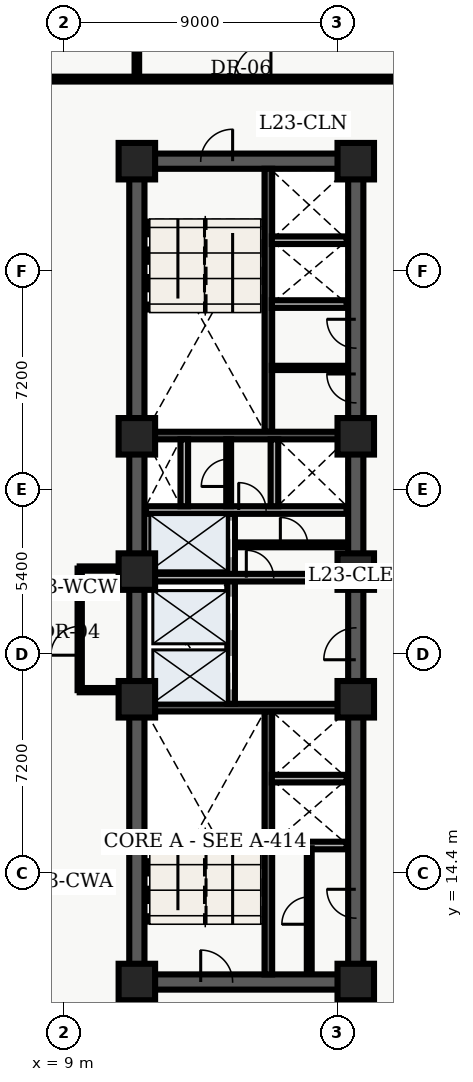
"""IFC4 building model, lengths in metres.
Left out: names, types, materials, properties, quantities, classifications, styles, units other than length and angle.
Written with IfcOpenShell. Run it as: python <this file> out.ifc"""

import sys

from ifc_helpers import new_model, entity, si_unit, converted_unit, direction, frame, origin_with_axes, origin_2d_with_axis, place, context, subcontext, project, spatial, polyline, rectangle, outline, extrude, element, fill, save


model = new_model("IFC4")
c1 = context("Model", 3, precision=1e-05, world=origin_with_axes(), true_north=direction((0.0, 1.0)))
c2 = subcontext(c1, "Body", "Model", "MODEL_VIEW")
j1 = project(units=[si_unit("LENGTHUNIT", "METRE"), converted_unit("PLANEANGLEUNIT", "DEGREE", entity("IfcPlaneAngleMeasure", 0.017), si_unit("PLANEANGLEUNIT", "RADIAN"), dimensions=[0, 0, 0, 0, 0, 0, 0])], contexts=[c1])
p1 = place(None, origin_with_axes())
s1 = spatial("IfcSite", under=j1, at=p1, CompositionType="ELEMENT")
p2 = place(p1, origin_with_axes())
s2 = spatial("IfcBuilding", under=s1, at=p2, CompositionType="ELEMENT")
p3 = place(p2, frame((0.0, 0.0, 96.9), z_axis=(0.0, 0.0, 1.0), x_axis=(1.0, 0.0, 0.0)))
s3 = spatial("IfcBuildingStorey", under=s2, at=p3, CompositionType="ELEMENT", Elevation=96.9)
p4 = place(p3, frame((11.4, 10.8, 0.0), z_axis=(0.0, 0.0, 1.0), x_axis=(0.0, 1.0, 0.0)))
e1 = element("IfcWall", 1, at=p4, inside=s3, PredefinedType="SHEAR", context=c2, shape_type="SweptSolid", body=[
    extrude(outline(polyline([(0.0, -0.25), (27.0, -0.25), (27.0, 0.25), (0.0, 0.25), (0.0, -0.25)])), origin_with_axes(), (0.0, 0.0, 1.0), 3.66),
])
p5 = place(p3, frame((11.4, 10.8, 0.0), z_axis=(0.0, 0.0, 1.0), x_axis=(1.0, 0.0, 0.0)))
e2 = element("IfcWall", 2, at=p5, inside=s3, PredefinedType="SHEAR", context=c2, shape_type="SweptSolid", body=[
    extrude(outline(polyline([(0.0, -0.25), (7.2, -0.25), (7.2, 0.25), (0.0, 0.25), (0.0, -0.25)])), origin_with_axes(), (0.0, 0.0, 1.0), 3.66),
])
p6 = place(p5, frame((2.625, 0.0, 0.0), z_axis=(0.0, 0.0, 1.0), x_axis=(1.0, 0.0, 0.0)))
e3 = element("IfcOpeningElement", 3, at=p6, cuts=e2, PredefinedType="OPENING", context=c2, shape_type="SweptSolid", body=[
    extrude(rectangle(XDim=1.05, YDim=0.52, at=origin_2d_with_axis()), origin_with_axes(), (0.0, 0.0, 1.0), 2.15),
])
p7 = place(p3, frame((11.4, 37.8, 0.0), z_axis=(0.0, 0.0, 1.0), x_axis=(1.0, 0.0, 0.0)))
e4 = element("IfcWall", 4, at=p7, inside=s3, PredefinedType="SHEAR", context=c2, shape_type="SweptSolid", body=[
    extrude(outline(polyline([(0.0, -0.25), (7.2, -0.25), (7.2, 0.25), (0.0, 0.25), (0.0, -0.25)])), origin_with_axes(), (0.0, 0.0, 1.0), 3.66),
])
p8 = place(p7, frame((2.625, 0.0, 0.0), z_axis=(0.0, 0.0, 1.0), x_axis=(1.0, 0.0, 0.0)))
e5 = element("IfcOpeningElement", 5, at=p8, cuts=e4, PredefinedType="OPENING", context=c2, shape_type="SweptSolid", body=[
    extrude(rectangle(XDim=1.05, YDim=0.52, at=origin_2d_with_axis()), origin_with_axes(), (0.0, 0.0, 1.0), 2.15),
])
p9 = place(p3, frame((18.6, 10.8, 0.0), z_axis=(0.0, 0.0, 1.0), x_axis=(0.0, 1.0, 0.0)))
e6 = element("IfcWall", 6, at=p9, inside=s3, PredefinedType="SHEAR", context=c2, shape_type="SweptSolid", body=[
    extrude(outline(polyline([(0.0, -0.25), (13.5, -0.25), (13.5, 0.25), (0.0, 0.25), (0.0, -0.25)])), origin_with_axes(), (0.0, 0.0, 1.0), 3.66),
])
p10 = place(p9, frame((11.125, 0.0, 0.0), z_axis=(0.0, 0.0, 1.0), x_axis=(1.0, 0.0, 0.0)))
e7 = element("IfcOpeningElement", 7, at=p10, cuts=e6, PredefinedType="OPENING", context=c2, shape_type="SweptSolid", body=[
    extrude(rectangle(XDim=1.05, YDim=0.52, at=origin_2d_with_axis()), origin_with_axes(), (0.0, 0.0, 1.0), 2.15),
])
p11 = place(p9, frame((2.575, 0.0, 0.0), z_axis=(0.0, 0.0, 1.0), x_axis=(1.0, 0.0, 0.0)))
e8 = element("IfcOpeningElement", 8, at=p11, cuts=e6, PredefinedType="OPENING", context=c2, shape_type="SweptSolid", body=[
    extrude(rectangle(XDim=0.95, YDim=0.52, at=origin_2d_with_axis()), origin_with_axes(), (0.0, 0.0, 1.0), 2.15),
])
p12 = place(p3, frame((18.6, 24.3, 0.0), z_axis=(0.0, 0.0, 1.0), x_axis=(0.0, 1.0, 0.0)))
e9 = element("IfcWall", 9, at=p12, inside=s3, PredefinedType="SHEAR", context=c2, shape_type="SweptSolid", body=[
    extrude(outline(polyline([(0.0, -0.25), (13.5, -0.25), (13.5, 0.25), (0.0, 0.25), (0.0, -0.25)])), origin_with_axes(), (0.0, 0.0, 1.0), 3.66),
])
p13 = place(p12, frame((6.025, 0.0, 0.0), z_axis=(0.0, 0.0, 1.0), x_axis=(1.0, 0.0, 0.0)))
e10 = element("IfcOpeningElement", 10, at=p13, cuts=e9, PredefinedType="OPENING", context=c2, shape_type="SweptSolid", body=[
    extrude(rectangle(XDim=0.95, YDim=0.52, at=origin_2d_with_axis()), origin_with_axes(), (0.0, 0.0, 1.0), 2.15),
])
p14 = place(p12, frame((7.825, 0.0, 0.0), z_axis=(0.0, 0.0, 1.0), x_axis=(1.0, 0.0, 0.0)))
e11 = element("IfcOpeningElement", 11, at=p14, cuts=e9, PredefinedType="OPENING", context=c2, shape_type="SweptSolid", body=[
    extrude(rectangle(XDim=0.95, YDim=0.52, at=origin_2d_with_axis()), origin_with_axes(), (0.0, 0.0, 1.0), 2.15),
])
p15 = place(p3, frame((15.725, 11.05, 0.0), z_axis=(0.0, 0.0, 1.0), x_axis=(0.0, 1.0, 0.0)))
e12 = element("IfcWall", 12, at=p15, inside=s3, PredefinedType="SHEAR", context=c2, shape_type="SweptSolid", body=[
    extrude(outline(polyline([(0.0, -0.125), (8.65, -0.125), (8.65, 0.125), (0.0, 0.125), (0.0, -0.125)])), origin_with_axes(), (0.0, 0.0, 1.0), 3.66),
])
p16 = place(p3, frame((11.65, 19.825, 0.0), z_axis=(0.0, 0.0, 1.0), x_axis=(1.0, 0.0, 0.0)))
e13 = element("IfcWall", 13, at=p16, inside=s3, PredefinedType="SHEAR", context=c2, shape_type="SweptSolid", body=[
    extrude(outline(polyline([(0.0, -0.125), (6.7, -0.125), (6.7, 0.125), (0.0, 0.125), (0.0, -0.125)])), origin_with_axes(), (0.0, 0.0, 1.0), 3.66),
])
p17 = place(p3, frame((15.725, 28.9, 0.0), z_axis=(0.0, 0.0, 1.0), x_axis=(0.0, 1.0, 0.0)))
e14 = element("IfcWall", 14, at=p17, inside=s3, PredefinedType="SHEAR", context=c2, shape_type="SweptSolid", body=[
    extrude(outline(polyline([(0.0, -0.125), (8.65, -0.125), (8.65, 0.125), (0.0, 0.125), (0.0, -0.125)])), origin_with_axes(), (0.0, 0.0, 1.0), 3.66),
])
p18 = place(p3, frame((11.65, 28.775, 0.0), z_axis=(0.0, 0.0, 1.0), x_axis=(1.0, 0.0, 0.0)))
e15 = element("IfcWall", 15, at=p18, inside=s3, PredefinedType="SHEAR", context=c2, shape_type="SweptSolid", body=[
    extrude(outline(polyline([(0.0, -0.125), (6.7, -0.125), (6.7, 0.125), (0.0, 0.125), (0.0, -0.125)])), origin_with_axes(), (0.0, 0.0, 1.0), 3.66),
])
p19 = place(p3, frame((14.5, 19.95, 0.0), z_axis=(0.0, 0.0, 1.0), x_axis=(0.0, 1.0, 0.0)))
e16 = element("IfcWall", 16, at=p19, inside=s3, PredefinedType="SOLIDWALL", context=c2, shape_type="SweptSolid", body=[
    extrude(outline(polyline([(0.0, -0.125), (6.25, -0.125), (6.25, 0.125), (0.0, 0.125), (0.0, -0.125)])), origin_with_axes(), (0.0, 0.0, 1.0), 2.7),
])
p20 = place(p19, frame((1.025, 0.0, 0.0), z_axis=(0.0, 0.0, 1.0), x_axis=(1.0, 0.0, 0.0)))
e17 = element("IfcOpeningElement", 17, at=p20, cuts=e16, PredefinedType="OPENING", context=c2, shape_type="SweptSolid", body=[
    extrude(rectangle(XDim=1.1, YDim=0.27, at=origin_2d_with_axis()), origin_with_axes(), (0.0, 0.0, 1.0), 2.15),
])
p21 = place(p19, frame((2.975, 0.0, 0.0), z_axis=(0.0, 0.0, 1.0), x_axis=(1.0, 0.0, 0.0)))
e18 = element("IfcOpeningElement", 18, at=p21, cuts=e16, PredefinedType="OPENING", context=c2, shape_type="SweptSolid", body=[
    extrude(rectangle(XDim=1.1, YDim=0.27, at=origin_2d_with_axis()), origin_with_axes(), (0.0, 0.0, 1.0), 2.15),
])
p22 = place(p19, frame((5.425, 0.0, 0.0), z_axis=(0.0, 0.0, 1.0), x_axis=(1.0, 0.0, 0.0)))
e19 = element("IfcOpeningElement", 19, at=p22, cuts=e16, PredefinedType="OPENING", context=c2, shape_type="SweptSolid", body=[
    extrude(rectangle(XDim=1.2, YDim=0.27, at=origin_2d_with_axis()), origin_with_axes(), (0.0, 0.0, 1.0), 2.15),
])
p23 = place(p3, frame((11.7, 24.1, 0.0), z_axis=(0.0, 0.0, 1.0), x_axis=(1.0, 0.0, 0.0)))
e20 = element("IfcWall", 20, at=p23, inside=s3, PredefinedType="SOLIDWALL", context=c2, shape_type="SweptSolid", body=[
    extrude(outline(polyline([(0.0, -0.125), (6.6, -0.125), (6.6, 0.125), (0.0, 0.125), (0.0, -0.125)])), origin_with_axes(), (0.0, 0.0, 1.0), 2.7),
])
p24 = place(p23, frame((3.75, 0.0, 0.0), z_axis=(0.0, 0.0, 1.0), x_axis=(1.0, 0.0, 0.0)))
e21 = element("IfcOpeningElement", 21, at=p24, cuts=e20, PredefinedType="OPENING", context=c2, shape_type="SweptSolid", body=[
    extrude(rectangle(XDim=0.9, YDim=0.27, at=origin_2d_with_axis()), origin_with_axes(), (0.0, 0.0, 1.0), 2.15),
])
p25 = place(p3, frame((11.7, 26.325, 0.0), z_axis=(0.0, 0.0, 1.0), x_axis=(1.0, 0.0, 0.0)))
e22 = element("IfcWall", 22, at=p25, inside=s3, PredefinedType="SOLIDWALL", context=c2, shape_type="SweptSolid", body=[
    extrude(outline(polyline([(0.0, -0.125), (6.6, -0.125), (6.6, 0.125), (0.0, 0.125), (0.0, -0.125)])), origin_with_axes(), (0.0, 0.0, 1.0), 2.7),
])
p26 = place(p25, frame((3.5, 0.0, 0.0), z_axis=(0.0, 0.0, 1.0), x_axis=(1.0, 0.0, 0.0)))
e23 = element("IfcOpeningElement", 23, at=p26, cuts=e22, PredefinedType="OPENING", context=c2, shape_type="SweptSolid", body=[
    extrude(rectangle(XDim=0.9, YDim=0.27, at=origin_2d_with_axis()), origin_with_axes(), (0.0, 0.0, 1.0), 2.15),
])
for number, where, z_axis, x_axis in (
    (24, (12.96, 26.45, 0.0), (0.0, 0.0, 1.0), (0.0, 1.0, 0.0)),
    (25, (15.925, 26.45, 0.0), (0.0, 0.0, 1.0), (0.0, 1.0, 0.0)),
):
    element("IfcWall", number, at=place(p3, frame(where, z_axis=z_axis, x_axis=x_axis)), inside=s3, PredefinedType="SOLIDWALL", context=c2, shape_type="SweptSolid", body=[
        extrude(outline(polyline([(0.0, -0.125), (2.2, -0.125), (2.2, 0.125), (0.0, 0.125), (0.0, -0.125)])), origin_with_axes(), (0.0, 0.0, 1.0), 2.7),
    ])
for number, where, z_axis, x_axis in (
    (26, (11.4, 10.8, 0.0), (0.0, 0.0, 1.0), (1.0, 0.0, 0.0)),
    (27, (11.4, 20.1, 0.0), (0.0, 0.0, 1.0), (1.0, 0.0, 0.0)),
    (28, (11.4, 24.3, 0.0), (0.0, 0.0, 1.0), (1.0, 0.0, 0.0)),
    (29, (11.4, 28.75, 0.0), (0.0, 0.0, 1.0), (1.0, 0.0, 0.0)),
    (30, (11.4, 37.8, 0.0), (0.0, 0.0, 1.0), (1.0, 0.0, 0.0)),
    (31, (18.6, 10.8, 0.0), (0.0, 0.0, 1.0), (1.0, 0.0, 0.0)),
    (32, (18.6, 20.1, 0.0), (0.0, 0.0, 1.0), (1.0, 0.0, 0.0)),
    (33, (18.6, 24.3, 0.0), (0.0, 0.0, 1.0), (1.0, 0.0, 0.0)),
    (34, (18.6, 28.75, 0.0), (0.0, 0.0, 1.0), (1.0, 0.0, 0.0)),
    (35, (18.6, 37.8, 0.0), (0.0, 0.0, 1.0), (1.0, 0.0, 0.0)),
):
    element("IfcColumn", number, at=place(p3, frame(where, z_axis=z_axis, x_axis=x_axis)), inside=s3, PredefinedType="COLUMN", context=c2, shape_type="SweptSolid", body=[
        extrude(rectangle(XDim=1.2, YDim=1.2, at=origin_2d_with_axis()), origin_with_axes(), (0.0, 0.0, 1.0), 3.9),
    ])
p27 = place(p3, frame((14.62, 25.18, 0.0), z_axis=(0.0, 0.0, 1.0), x_axis=(1.0, 0.0, 0.0)))
e36 = element("IfcWall", 36, at=p27, inside=s3, PredefinedType="PARTITIONING", context=c2, shape_type="SweptSolid", body=[
    extrude(outline(polyline([(0.0, -0.08), (3.68, -0.08), (3.68, 0.08), (0.0, 0.08), (0.0, -0.08)])), origin_with_axes(), (0.0, 0.0, 1.0), 2.7),
])
p28 = place(p27, frame((1.95, 0.0, 0.0), z_axis=(0.0, 0.0, 1.0), x_axis=(1.0, 0.0, 0.0)))
e37 = element("IfcOpeningElement", 37, at=p28, cuts=e36, PredefinedType="OPENING", context=c2, shape_type="SweptSolid", body=[
    extrude(rectangle(XDim=0.9, YDim=0.18, at=origin_2d_with_axis()), origin_with_axes(), (0.0, 0.0, 1.0), 2.15),
])
p29 = place(p3, frame((14.42, 26.45, 0.0), z_axis=(0.0, 0.0, 1.0), x_axis=(0.0, 1.0, 0.0)))
e38 = element("IfcWall", 38, at=p29, inside=s3, PredefinedType="PARTITIONING", context=c2, shape_type="SweptSolid", body=[
    extrude(outline(polyline([(0.0, -0.08), (2.2, -0.08), (2.2, 0.08), (0.0, 0.08), (0.0, -0.08)])), origin_with_axes(), (0.0, 0.0, 1.0), 2.7),
])
p30 = place(p29, frame((1.1, 0.0, 0.0), z_axis=(0.0, 0.0, 1.0), x_axis=(1.0, 0.0, 0.0)))
e39 = element("IfcOpeningElement", 39, at=p30, cuts=e38, PredefinedType="OPENING", context=c2, shape_type="SweptSolid", body=[
    extrude(rectangle(XDim=0.9, YDim=0.18, at=origin_2d_with_axis()), origin_with_axes(), (0.0, 0.0, 1.0), 2.15),
])
for number, where, z_axis, x_axis in (
    (40, (15.84, 15.29, 0.0), (0.0, 0.0, 1.0), (1.0, 0.0, 0.0)),
    (41, (15.84, 17.49, 0.0), (0.0, 0.0, 1.0), (1.0, 0.0, 0.0)),
):
    element("IfcWall", number, at=place(p3, frame(where, z_axis=z_axis, x_axis=x_axis)), inside=s3, PredefinedType="SOLIDWALL", context=c2, shape_type="SweptSolid", body=[
        extrude(outline(polyline([(0.0, -0.125), (2.46, -0.125), (2.46, 0.125), (0.0, 0.125), (0.0, -0.125)])), origin_with_axes(), (0.0, 0.0, 1.0), 2.7),
    ])
p31 = place(p3, frame((17.07, 11.1, 0.0), z_axis=(0.0, 0.0, 1.0), x_axis=(0.0, 1.0, 0.0)))
e42 = element("IfcWall", 42, at=p31, inside=s3, PredefinedType="PARTITIONING", context=c2, shape_type="SweptSolid", body=[
    extrude(outline(polyline([(0.0, -0.08), (4.1, -0.08), (4.1, 0.08), (0.0, 0.08), (0.0, -0.08)])), origin_with_axes(), (0.0, 0.0, 1.0), 2.7),
])
p32 = place(p31, frame((2.05, 0.0, 0.0), z_axis=(0.0, 0.0, 1.0), x_axis=(1.0, 0.0, 0.0)))
e43 = element("IfcOpeningElement", 43, at=p32, cuts=e42, PredefinedType="OPENING", context=c2, shape_type="SweptSolid", body=[
    extrude(rectangle(XDim=0.9, YDim=0.18, at=origin_2d_with_axis()), origin_with_axes(), (0.0, 0.0, 1.0), 2.15),
])
for number, where, z_axis, x_axis in (
    (44, (15.84, 33.1, 0.0), (0.0, 0.0, 1.0), (1.0, 0.0, 0.0)),
    (45, (15.84, 35.2, 0.0), (0.0, 0.0, 1.0), (1.0, 0.0, 0.0)),
):
    element("IfcWall", number, at=place(p3, frame(where, z_axis=z_axis, x_axis=x_axis)), inside=s3, PredefinedType="SOLIDWALL", context=c2, shape_type="SweptSolid", body=[
        extrude(outline(polyline([(0.0, -0.125), (2.46, -0.125), (2.46, 0.125), (0.0, 0.125), (0.0, -0.125)])), origin_with_axes(), (0.0, 0.0, 1.0), 2.7),
    ])
p33 = place(p3, frame((15.84, 31.0, 0.0), z_axis=(0.0, 0.0, 1.0), x_axis=(1.0, 0.0, 0.0)))
e46 = element("IfcWall", 46, at=p33, inside=s3, PredefinedType="PARTITIONING", context=c2, shape_type="SweptSolid", body=[
    extrude(outline(polyline([(0.0, -0.07), (2.46, -0.07), (2.46, 0.07), (0.0, 0.07), (0.0, -0.07)])), origin_with_axes(), (0.0, 0.0, 1.0), 2.7),
])
p34 = place(p3, frame((9.52, 20.4, 0.0), z_axis=(0.0, 0.0, 1.0), x_axis=(0.0, 1.0, 0.0)))
e47 = element("IfcWall", 47, at=p34, inside=s3, PredefinedType="PARTITIONING", context=c2, shape_type="SweptSolid", body=[
    extrude(outline(polyline([(0.0, -0.07), (4.0, -0.07), (4.0, 0.07), (0.0, 0.07), (0.0, -0.07)])), origin_with_axes(), (0.0, 0.0, 1.0), 2.7),
])
p35 = place(p34, frame((1.625, 0.0, 0.0), z_axis=(0.0, 0.0, 1.0), x_axis=(1.0, 0.0, 0.0)))
e48 = element("IfcOpeningElement", 48, at=p35, cuts=e47, PredefinedType="OPENING", context=c2, shape_type="SweptSolid", body=[
    extrude(rectangle(XDim=0.95, YDim=0.16, at=origin_2d_with_axis()), origin_with_axes(), (0.0, 0.0, 1.0), 2.15),
])
for number, where, z_axis, x_axis in (
    (49, (9.52, 20.4, 0.0), (0.0, 0.0, 1.0), (1.0, 0.0, 0.0)),
    (50, (9.52, 24.4, 0.0), (0.0, 0.0, 1.0), (1.0, 0.0, 0.0)),
):
    element("IfcWall", number, at=place(p3, frame(where, z_axis=z_axis, x_axis=x_axis)), inside=s3, PredefinedType="PARTITIONING", context=c2, shape_type="SweptSolid", body=[
        extrude(outline(polyline([(0.0, -0.07), (1.58, -0.07), (1.58, 0.07), (0.0, 0.07), (0.0, -0.07)])), origin_with_axes(), (0.0, 0.0, 1.0), 2.7),
    ])
p36 = place(p3, frame((2.6, 40.5, 0.0), z_axis=(0.0, 0.0, 1.0), x_axis=(1.0, 0.0, 0.0)))
e51 = element("IfcWall", 51, at=p36, inside=s3, PredefinedType="PARTITIONING", context=c2, shape_type="SweptSolid", body=[
    extrude(outline(polyline([(0.0, -0.08), (18.65, -0.08), (18.65, 0.08), (0.0, 0.08), (0.0, -0.08)])), origin_with_axes(), (0.0, 0.0, 1.0), 2.7),
])
p37 = place(p36, frame((5.275, 0.0, 0.0), z_axis=(0.0, 0.0, 1.0), x_axis=(1.0, 0.0, 0.0)))
e52 = element("IfcOpeningElement", 52, at=p37, cuts=e51, PredefinedType="OPENING", context=c2, shape_type="SweptSolid", body=[
    extrude(rectangle(XDim=1.0, YDim=0.18, at=origin_2d_with_axis()), origin_with_axes(), (0.0, 0.0, 1.0), 2.15),
])
p38 = place(p36, frame((12.61, 0.0, 0.0), z_axis=(0.0, 0.0, 1.0), x_axis=(1.0, 0.0, 0.0)))
e53 = element("IfcOpeningElement", 53, at=p38, cuts=e51, PredefinedType="OPENING", context=c2, shape_type="SweptSolid", body=[
    extrude(rectangle(XDim=1.2, YDim=0.18, at=origin_2d_with_axis()), origin_with_axes(), (0.0, 0.0, 1.0), 2.2),
])
p39 = place(p3, frame((11.4, 40.6, 0.0), z_axis=(0.0, 0.0, 1.0), x_axis=(0.0, 1.0, 0.0)))
e54 = element("IfcWall", 54, at=p39, inside=s3, PredefinedType="PARTITIONING", context=c2, shape_type="SweptSolid", body=[
    extrude(outline(polyline([(0.0, -0.075), (7.64, -0.075), (7.64, 0.075), (0.0, 0.075), (0.0, -0.075)])), origin_with_axes(), (0.0, 0.0, 1.0), 2.7),
])
p40 = place(p19, frame((1.025, 0.0, 0.0), z_axis=(0.0, 0.0, 1.0), x_axis=(1.0, 0.0, 0.0)))
e55 = element("IfcDoor", 55, at=p40, inside=s3, OperationType="SLIDING_TO_LEFT", PredefinedType="DOOR", context=c2, shape_type="SweptSolid", body=[
    extrude(rectangle(XDim=1.1, YDim=0.09, at=origin_2d_with_axis()), origin_with_axes(), (0.0, 0.0, 1.0), 2.15),
])
fill(e17, e55)
p41 = place(p19, frame((2.975, 0.0, 0.0), z_axis=(0.0, 0.0, 1.0), x_axis=(1.0, 0.0, 0.0)))
e56 = element("IfcDoor", 56, at=p41, inside=s3, OperationType="SLIDING_TO_RIGHT", PredefinedType="DOOR", context=c2, shape_type="SweptSolid", body=[
    extrude(rectangle(XDim=1.1, YDim=0.09, at=origin_2d_with_axis()), origin_with_axes(), (0.0, 0.0, 1.0), 2.15),
])
fill(e18, e56)
p42 = place(p19, frame((5.425, 0.0, 0.0), z_axis=(0.0, 0.0, 1.0), x_axis=(1.0, 0.0, 0.0)))
e57 = element("IfcDoor", 57, at=p42, inside=s3, OperationType="DOUBLE_DOOR_SLIDING", PredefinedType="DOOR", context=c2, shape_type="SweptSolid", body=[
    extrude(rectangle(XDim=1.2, YDim=0.09, at=origin_2d_with_axis()), origin_with_axes(), (0.0, 0.0, 1.0), 2.15),
])
fill(e19, e57)
p43 = place(p5, frame((2.625, 0.0, 0.0), z_axis=(0.0, 0.0, 1.0), x_axis=(1.0, 0.0, 0.0)))
e58 = element("IfcDoor", 58, at=p43, inside=s3, OperationType="SINGLE_SWING_LEFT", PredefinedType="DOOR", context=c2, shape_type="SweptSolid", body=[
    extrude(rectangle(XDim=1.05, YDim=0.09, at=origin_2d_with_axis()), origin_with_axes(), (0.0, 0.0, 1.0), 2.15),
])
fill(e3, e58)
p44 = place(p7, frame((2.625, 0.0, 0.0), z_axis=(0.0, 0.0, 1.0), x_axis=(1.0, 0.0, 0.0)))
e59 = element("IfcDoor", 59, at=p44, inside=s3, OperationType="SINGLE_SWING_RIGHT", PredefinedType="DOOR", context=c2, shape_type="SweptSolid", body=[
    extrude(rectangle(XDim=1.05, YDim=0.09, at=origin_2d_with_axis()), origin_with_axes(), (0.0, 0.0, 1.0), 2.15),
])
fill(e5, e59)
p45 = place(p9, frame((11.125, 0.0, 0.0), z_axis=(0.0, 0.0, 1.0), x_axis=(1.0, 0.0, 0.0)))
e60 = element("IfcDoor", 60, at=p45, inside=s3, OperationType="SINGLE_SWING_LEFT", PredefinedType="DOOR", context=c2, shape_type="SweptSolid", body=[
    extrude(rectangle(XDim=1.05, YDim=0.09, at=origin_2d_with_axis()), origin_with_axes(), (0.0, 0.0, 1.0), 2.15),
])
fill(e7, e60)
p46 = place(p25, frame((3.5, 0.0, 0.0), z_axis=(0.0, 0.0, 1.0), x_axis=(1.0, 0.0, 0.0)))
e61 = element("IfcDoor", 61, at=p46, inside=s3, OperationType="SINGLE_SWING_LEFT", PredefinedType="DOOR", context=c2, shape_type="SweptSolid", body=[
    extrude(rectangle(XDim=0.9, YDim=0.09, at=origin_2d_with_axis()), origin_with_axes(), (0.0, 0.0, 1.0), 2.15),
])
fill(e23, e61)
p47 = place(p29, frame((1.1, 0.0, 0.0), z_axis=(0.0, 0.0, 1.0), x_axis=(1.0, 0.0, 0.0)))
e62 = element("IfcDoor", 62, at=p47, inside=s3, OperationType="SINGLE_SWING_LEFT", PredefinedType="DOOR", context=c2, shape_type="SweptSolid", body=[
    extrude(rectangle(XDim=0.9, YDim=0.09, at=origin_2d_with_axis()), origin_with_axes(), (0.0, 0.0, 1.0), 2.15),
])
fill(e39, e62)
p48 = place(p23, frame((3.75, 0.0, 0.0), z_axis=(0.0, 0.0, 1.0), x_axis=(1.0, 0.0, 0.0)))
e63 = element("IfcDoor", 63, at=p48, inside=s3, OperationType="SINGLE_SWING_LEFT", PredefinedType="DOOR", context=c2, shape_type="SweptSolid", body=[
    extrude(rectangle(XDim=0.9, YDim=0.09, at=origin_2d_with_axis()), origin_with_axes(), (0.0, 0.0, 1.0), 2.15),
])
fill(e21, e63)
p49 = place(p27, frame((1.95, 0.0, 0.0), z_axis=(0.0, 0.0, 1.0), x_axis=(1.0, 0.0, 0.0)))
e64 = element("IfcDoor", 64, at=p49, inside=s3, OperationType="SINGLE_SWING_LEFT", PredefinedType="DOOR", context=c2, shape_type="SweptSolid", body=[
    extrude(rectangle(XDim=0.9, YDim=0.09, at=origin_2d_with_axis()), origin_with_axes(), (0.0, 0.0, 1.0), 2.15),
])
fill(e37, e64)
p50 = place(p31, frame((2.05, 0.0, 0.0), z_axis=(0.0, 0.0, 1.0), x_axis=(1.0, 0.0, 0.0)))
e65 = element("IfcDoor", 65, at=p50, inside=s3, OperationType="SINGLE_SWING_LEFT", PredefinedType="DOOR", context=c2, shape_type="SweptSolid", body=[
    extrude(rectangle(XDim=0.9, YDim=0.09, at=origin_2d_with_axis()), origin_with_axes(), (0.0, 0.0, 1.0), 2.15),
])
fill(e43, e65)
p51 = place(p9, frame((2.575, 0.0, 0.0), z_axis=(0.0, 0.0, 1.0), x_axis=(1.0, 0.0, 0.0)))
e66 = element("IfcDoor", 66, at=p51, inside=s3, OperationType="SINGLE_SWING_RIGHT", PredefinedType="DOOR", context=c2, shape_type="SweptSolid", body=[
    extrude(rectangle(XDim=0.95, YDim=0.09, at=origin_2d_with_axis()), origin_with_axes(), (0.0, 0.0, 1.0), 2.15),
])
fill(e8, e66)
p52 = place(p12, frame((6.025, 0.0, 0.0), z_axis=(0.0, 0.0, 1.0), x_axis=(1.0, 0.0, 0.0)))
e67 = element("IfcDoor", 67, at=p52, inside=s3, OperationType="SINGLE_SWING_RIGHT", PredefinedType="DOOR", context=c2, shape_type="SweptSolid", body=[
    extrude(rectangle(XDim=0.95, YDim=0.09, at=origin_2d_with_axis()), origin_with_axes(), (0.0, 0.0, 1.0), 2.15),
])
fill(e10, e67)
p53 = place(p12, frame((7.825, 0.0, 0.0), z_axis=(0.0, 0.0, 1.0), x_axis=(1.0, 0.0, 0.0)))
e68 = element("IfcDoor", 68, at=p53, inside=s3, OperationType="SINGLE_SWING_RIGHT", PredefinedType="DOOR", context=c2, shape_type="SweptSolid", body=[
    extrude(rectangle(XDim=0.95, YDim=0.09, at=origin_2d_with_axis()), origin_with_axes(), (0.0, 0.0, 1.0), 2.15),
])
fill(e11, e68)
p54 = place(p34, frame((1.625, 0.0, 0.0), z_axis=(0.0, 0.0, 1.0), x_axis=(1.0, 0.0, 0.0)))
e69 = element("IfcDoor", 69, at=p54, inside=s3, OperationType="SINGLE_SWING_LEFT", PredefinedType="DOOR", context=c2, shape_type="SweptSolid", body=[
    extrude(rectangle(XDim=0.95, YDim=0.084, at=origin_2d_with_axis()), origin_with_axes(), (0.0, 0.0, 1.0), 2.15),
])
fill(e48, e69)
p55 = place(p36, frame((12.61, 0.0, 0.0), z_axis=(0.0, 0.0, 1.0), x_axis=(1.0, 0.0, 0.0)))
e70 = element("IfcDoor", 70, at=p55, inside=s3, OperationType="SINGLE_SWING_RIGHT", PredefinedType="DOOR", context=c2, shape_type="SweptSolid", body=[
    extrude(rectangle(XDim=1.2, YDim=0.09, at=origin_2d_with_axis()), origin_with_axes(), (0.0, 0.0, 1.0), 2.2),
])
fill(e53, e70)
save(model, sys.argv[1])
